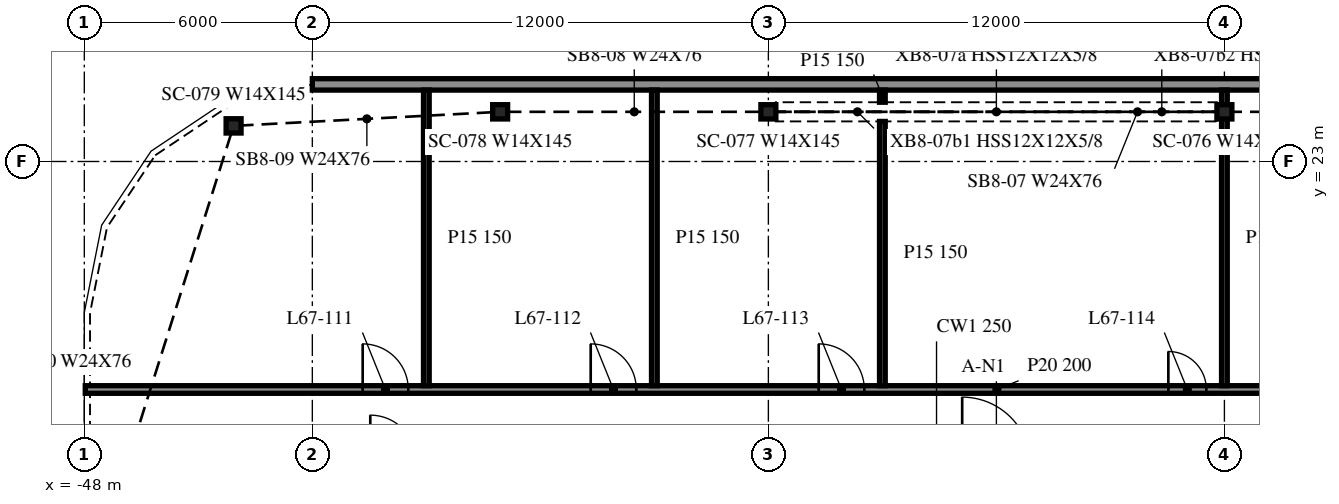
"""IFC4 building model, lengths in metres.
Left out: names, types, materials, properties, quantities, classifications, styles, units other than length and angle.
Written with IfcOpenShell. Run it as: python <this file> out.ifc"""

import sys

from ifc_helpers import new_model, si_unit, direction, frame, frame_2d, origin, origin_2d, place, context, subcontext, project, spatial, rectangle, i_section, extrude, element, fill, save


model = new_model("IFC4")
c1 = context("Model", 3, precision=1e-05, world=origin(), true_north=direction((0.0, 1.0)))
c2 = subcontext(c1, "Body", "Model", "MODEL_VIEW")
j1 = project(units=[si_unit("LENGTHUNIT", "METRE"), si_unit("PLANEANGLEUNIT", "RADIAN")], contexts=[c1])
p1 = place(None, origin())
s1 = spatial("IfcSite", under=j1, at=p1, CompositionType="ELEMENT")
p2 = place(p1, origin())
s2 = spatial("IfcBuilding", under=s1, at=p2, CompositionType="ELEMENT")
p3 = place(p2, frame((0.0, 0.0, 274.7)))
s3 = spatial("IfcBuildingStorey", under=s2, at=p3, CompositionType="ELEMENT", Elevation=274.7)
for number, where, z_axis, x_axis in (
    (1, (-18.0, 24.307, -0.34), (0.0, 0.0, 1.0), (1.0, 0.0, 0.0)),
    (2, (-30.0, 24.307, -0.34), (0.0, 0.0, 1.0), (1.0, 0.0, 0.0)),
    (3, (-37.058, 24.307, -0.34), (0.0, 0.0, 1.0), (1.0, 0.0, 0.0)),
    (4, (-44.072, 23.937, -0.34), (0.0, 0.0, 1.0), (1.0, 0.0, 0.0)),
):
    element("IfcColumn", number, at=place(p3, frame(where, z_axis=z_axis, x_axis=x_axis)), inside=s3, PredefinedType="COLUMN", context=c2, shape_type="SweptSolid", body=[
        extrude(i_section(OverallWidth=0.394, OverallDepth=0.376, WebThickness=0.017, FlangeThickness=0.028, at=origin_2d()), origin(), (0.0, 0.0, 1.0), 3.8),
    ])
p4 = place(p3, frame((42.0, 25.029, 0.0), z_axis=(0.0, 0.0, 1.0), x_axis=(-1.0, 0.0, 0.0)))
e5 = element("IfcWall", 5, at=p4, inside=s3, PredefinedType="NOTDEFINED", context=c2, shape_type="SweptSolid", body=[
    extrude(rectangle(XDim=84.0, YDim=0.3, at=frame_2d((42.0, 0.0))), origin(), (0.0, 0.0, 1.0), 2.853),
])
p5 = place(p3, frame((-47.975, 17.0, 0.0), z_axis=(0.0, 0.0, 1.0), x_axis=(1.0, 0.0, 0.0)))
e6 = element("IfcWall", 6, at=p5, inside=s3, PredefinedType="PARTITIONING", context=c2, shape_type="SweptSolid", body=[
    extrude(rectangle(XDim=95.95, YDim=0.2, at=frame_2d((47.975, 0.0))), origin(), (0.0, 0.0, 1.0), 3.46),
])
p6 = place(p5, frame((7.3, 0.0, 0.0)))
e7 = element("IfcOpeningElement", 7, at=p6, cuts=e6, PredefinedType="OPENING", context=c2, shape_type="SweptSolid", body=[
    extrude(rectangle(XDim=1.2, YDim=2.1, at=frame_2d((0.6, 1.05))), frame((0.0, 0.11, 0.0), z_axis=(0.0, -1.0, 0.0), x_axis=(1.0, 0.0, 0.0)), (0.0, 0.0, 1.0), 0.22),
])
p7 = place(p5, frame((13.3, 0.0, 0.0)))
e8 = element("IfcOpeningElement", 8, at=p7, cuts=e6, PredefinedType="OPENING", context=c2, shape_type="SweptSolid", body=[
    extrude(rectangle(XDim=1.2, YDim=2.1, at=frame_2d((0.6, 1.05))), frame((0.0, 0.11, 0.0), z_axis=(0.0, -1.0, 0.0), x_axis=(1.0, 0.0, 0.0)), (0.0, 0.0, 1.0), 0.22),
])
p8 = place(p5, frame((19.3, 0.0, 0.0)))
e9 = element("IfcOpeningElement", 9, at=p8, cuts=e6, PredefinedType="OPENING", context=c2, shape_type="SweptSolid", body=[
    extrude(rectangle(XDim=1.2, YDim=2.1, at=frame_2d((0.6, 1.05))), frame((0.0, 0.11, 0.0), z_axis=(0.0, -1.0, 0.0), x_axis=(1.0, 0.0, 0.0)), (0.0, 0.0, 1.0), 0.22),
])
p9 = place(p5, frame((28.5, 0.0, 0.0)))
e10 = element("IfcOpeningElement", 10, at=p9, cuts=e6, PredefinedType="OPENING", context=c2, shape_type="SweptSolid", body=[
    extrude(rectangle(XDim=1.0, YDim=2.1, at=frame_2d((0.5, 1.05))), frame((0.0, 0.11, 0.0), z_axis=(0.0, -1.0, 0.0), x_axis=(1.0, 0.0, 0.0)), (0.0, 0.0, 1.0), 0.22),
])
p10 = place(p5, frame((31.3, 0.0, 0.0)))
e11 = element("IfcOpeningElement", 11, at=p10, cuts=e6, PredefinedType="OPENING", context=c2, shape_type="SweptSolid", body=[
    extrude(rectangle(XDim=1.2, YDim=2.1, at=frame_2d((0.6, 1.05))), frame((0.0, 0.11, 0.0), z_axis=(0.0, -1.0, 0.0), x_axis=(1.0, 0.0, 0.0)), (0.0, 0.0, 1.0), 0.22),
])
p11 = place(p5, frame((37.5, 0.0, 0.0)))
e12 = element("IfcOpeningElement", 12, at=p11, cuts=e6, PredefinedType="OPENING", context=c2, shape_type="SweptSolid", body=[
    extrude(rectangle(XDim=1.0, YDim=2.1, at=frame_2d((0.5, 1.05))), frame((0.0, 0.11, 0.0), z_axis=(0.0, -1.0, 0.0), x_axis=(1.0, 0.0, 0.0)), (0.0, 0.0, 1.0), 0.22),
])
p12 = place(p5, frame((43.3, 0.0, 0.0)))
e13 = element("IfcOpeningElement", 13, at=p12, cuts=e6, PredefinedType="OPENING", context=c2, shape_type="SweptSolid", body=[
    extrude(rectangle(XDim=1.2, YDim=2.1, at=frame_2d((0.6, 1.05))), frame((0.0, 0.11, 0.0), z_axis=(0.0, -1.0, 0.0), x_axis=(1.0, 0.0, 0.0)), (0.0, 0.0, 1.0), 0.22),
])
p13 = place(p5, frame((47.3, 0.0, 0.0)))
e14 = element("IfcOpeningElement", 14, at=p13, cuts=e6, PredefinedType="OPENING", context=c2, shape_type="SweptSolid", body=[
    extrude(rectangle(XDim=1.2, YDim=2.1, at=frame_2d((0.6, 1.05))), frame((0.0, 0.11, 0.0), z_axis=(0.0, -1.0, 0.0), x_axis=(1.0, 0.0, 0.0)), (0.0, 0.0, 1.0), 0.22),
])
p14 = place(p5, frame((51.1, 0.0, 0.0)))
e15 = element("IfcOpeningElement", 15, at=p14, cuts=e6, PredefinedType="OPENING", context=c2, shape_type="SweptSolid", body=[
    extrude(rectangle(XDim=1.2, YDim=2.1, at=frame_2d((0.6, 1.05))), frame((0.0, 0.11, 0.0), z_axis=(0.0, -1.0, 0.0), x_axis=(1.0, 0.0, 0.0)), (0.0, 0.0, 1.0), 0.22),
])
p15 = place(p5, frame((60.1, 0.0, 0.0)))
e16 = element("IfcOpeningElement", 16, at=p15, cuts=e6, PredefinedType="OPENING", context=c2, shape_type="SweptSolid", body=[
    extrude(rectangle(XDim=1.0, YDim=2.1, at=frame_2d((0.5, 1.05))), frame((0.0, 0.11, 0.0), z_axis=(0.0, -1.0, 0.0), x_axis=(1.0, 0.0, 0.0)), (0.0, 0.0, 1.0), 0.22),
])
p16 = place(p5, frame((63.1, 0.0, 0.0)))
e17 = element("IfcOpeningElement", 17, at=p16, cuts=e6, PredefinedType="OPENING", context=c2, shape_type="SweptSolid", body=[
    extrude(rectangle(XDim=1.2, YDim=2.1, at=frame_2d((0.6, 1.05))), frame((0.0, 0.11, 0.0), z_axis=(0.0, -1.0, 0.0), x_axis=(1.0, 0.0, 0.0)), (0.0, 0.0, 1.0), 0.22),
])
p17 = place(p5, frame((69.1, 0.0, 0.0)))
e18 = element("IfcOpeningElement", 18, at=p17, cuts=e6, PredefinedType="OPENING", context=c2, shape_type="SweptSolid", body=[
    extrude(rectangle(XDim=1.0, YDim=2.1, at=frame_2d((0.5, 1.05))), frame((0.0, 0.11, 0.0), z_axis=(0.0, -1.0, 0.0), x_axis=(1.0, 0.0, 0.0)), (0.0, 0.0, 1.0), 0.22),
])
p18 = place(p5, frame((75.1, 0.0, 0.0)))
e19 = element("IfcOpeningElement", 19, at=p18, cuts=e6, PredefinedType="OPENING", context=c2, shape_type="SweptSolid", body=[
    extrude(rectangle(XDim=1.2, YDim=2.1, at=frame_2d((0.6, 1.05))), frame((0.0, 0.11, 0.0), z_axis=(0.0, -1.0, 0.0), x_axis=(1.0, 0.0, 0.0)), (0.0, 0.0, 1.0), 0.22),
])
p19 = place(p5, frame((81.1, 0.0, 0.0)))
e20 = element("IfcOpeningElement", 20, at=p19, cuts=e6, PredefinedType="OPENING", context=c2, shape_type="SweptSolid", body=[
    extrude(rectangle(XDim=1.2, YDim=2.1, at=frame_2d((0.6, 1.05))), frame((0.0, 0.11, 0.0), z_axis=(0.0, -1.0, 0.0), x_axis=(1.0, 0.0, 0.0)), (0.0, 0.0, 1.0), 0.22),
])
p20 = place(p5, frame((90.1, 0.0, 0.0)))
e21 = element("IfcOpeningElement", 21, at=p20, cuts=e6, PredefinedType="OPENING", context=c2, shape_type="SweptSolid", body=[
    extrude(rectangle(XDim=1.2, YDim=2.1, at=frame_2d((0.6, 1.05))), frame((0.0, 0.11, 0.0), z_axis=(0.0, -1.0, 0.0), x_axis=(1.0, 0.0, 0.0)), (0.0, 0.0, 1.0), 0.22),
])
for number, where, z_axis, x_axis in (
    (22, (-39.0, 17.1, 0.0), (0.0, 0.0, 1.0), (0.0, 1.0, 0.0)),
    (23, (-33.0, 17.1, 0.0), (0.0, 0.0, 1.0), (0.0, 1.0, 0.0)),
):
    element("IfcWall", number, at=place(p3, frame(where, z_axis=z_axis, x_axis=x_axis)), inside=s3, PredefinedType="PARTITIONING", context=c2, shape_type="SweptSolid", body=[
        extrude(rectangle(XDim=7.779, YDim=0.15, at=frame_2d((3.889, 0.0))), origin(), (0.0, 0.0, 1.0), 3.46),
    ])
p21 = place(p3, frame((-27.0, 17.1, 0.0), z_axis=(0.0, 0.0, 1.0), x_axis=(0.0, 1.0, 0.0)))
e24 = element("IfcWall", 24, at=p21, inside=s3, PredefinedType="PARTITIONING", context=c2, shape_type="SweptSolid", body=[
    extrude(rectangle(XDim=6.955, YDim=0.15, at=frame_2d((3.477, 0.0))), origin(), (0.0, 0.0, 1.0), 3.46),
])
p22 = place(p3, frame((-27.0, 24.559, 0.0), z_axis=(0.0, 0.0, 1.0), x_axis=(0.0, 1.0, 0.0)))
e25 = element("IfcWall", 25, at=p22, inside=s3, PredefinedType="PARTITIONING", context=c2, shape_type="SweptSolid", body=[
    extrude(rectangle(XDim=0.32, YDim=0.15, at=frame_2d((0.16, 0.0))), origin(), (0.0, 0.0, 1.0), 3.46),
])
p23 = place(p3, frame((-18.0, 17.1, 0.0), z_axis=(0.0, 0.0, 1.0), x_axis=(0.0, 1.0, 0.0)))
e26 = element("IfcWall", 26, at=p23, inside=s3, PredefinedType="PARTITIONING", context=c2, shape_type="SweptSolid", body=[
    extrude(rectangle(XDim=7.779, YDim=0.15, at=frame_2d((3.889, 0.0))), origin(), (0.0, 0.0, 1.0), 3.46),
])
p24 = place(p6, origin())
e27 = element("IfcDoor", 27, at=p24, inside=s3, OperationType="SINGLE_SWING_LEFT", PredefinedType="DOOR", context=c2, shape_type="SweptSolid", body=[
    extrude(rectangle(XDim=1.2, YDim=2.1, at=frame_2d((0.6, 1.05))), frame((0.0, 0.025, 0.0), z_axis=(0.0, -1.0, 0.0), x_axis=(1.0, 0.0, 0.0)), (0.0, 0.0, 1.0), 0.05),
])
fill(e7, e27)
p25 = place(p7, origin())
e28 = element("IfcDoor", 28, at=p25, inside=s3, OperationType="SINGLE_SWING_LEFT", PredefinedType="DOOR", context=c2, shape_type="SweptSolid", body=[
    extrude(rectangle(XDim=1.2, YDim=2.1, at=frame_2d((0.6, 1.05))), frame((0.0, 0.025, 0.0), z_axis=(0.0, -1.0, 0.0), x_axis=(1.0, 0.0, 0.0)), (0.0, 0.0, 1.0), 0.05),
])
fill(e8, e28)
p26 = place(p8, origin())
e29 = element("IfcDoor", 29, at=p26, inside=s3, OperationType="SINGLE_SWING_LEFT", PredefinedType="DOOR", context=c2, shape_type="SweptSolid", body=[
    extrude(rectangle(XDim=1.2, YDim=2.1, at=frame_2d((0.6, 1.05))), frame((0.0, 0.025, 0.0), z_axis=(0.0, -1.0, 0.0), x_axis=(1.0, 0.0, 0.0)), (0.0, 0.0, 1.0), 0.05),
])
fill(e9, e29)
p27 = place(p9, origin())
e30 = element("IfcDoor", 30, at=p27, inside=s3, OperationType="SINGLE_SWING_LEFT", PredefinedType="DOOR", context=c2, shape_type="SweptSolid", body=[
    extrude(rectangle(XDim=1.0, YDim=2.1, at=frame_2d((0.5, 1.05))), frame((0.0, 0.025, 0.0), z_axis=(0.0, -1.0, 0.0), x_axis=(1.0, 0.0, 0.0)), (0.0, 0.0, 1.0), 0.05),
])
fill(e10, e30)
save(model, sys.argv[1])
